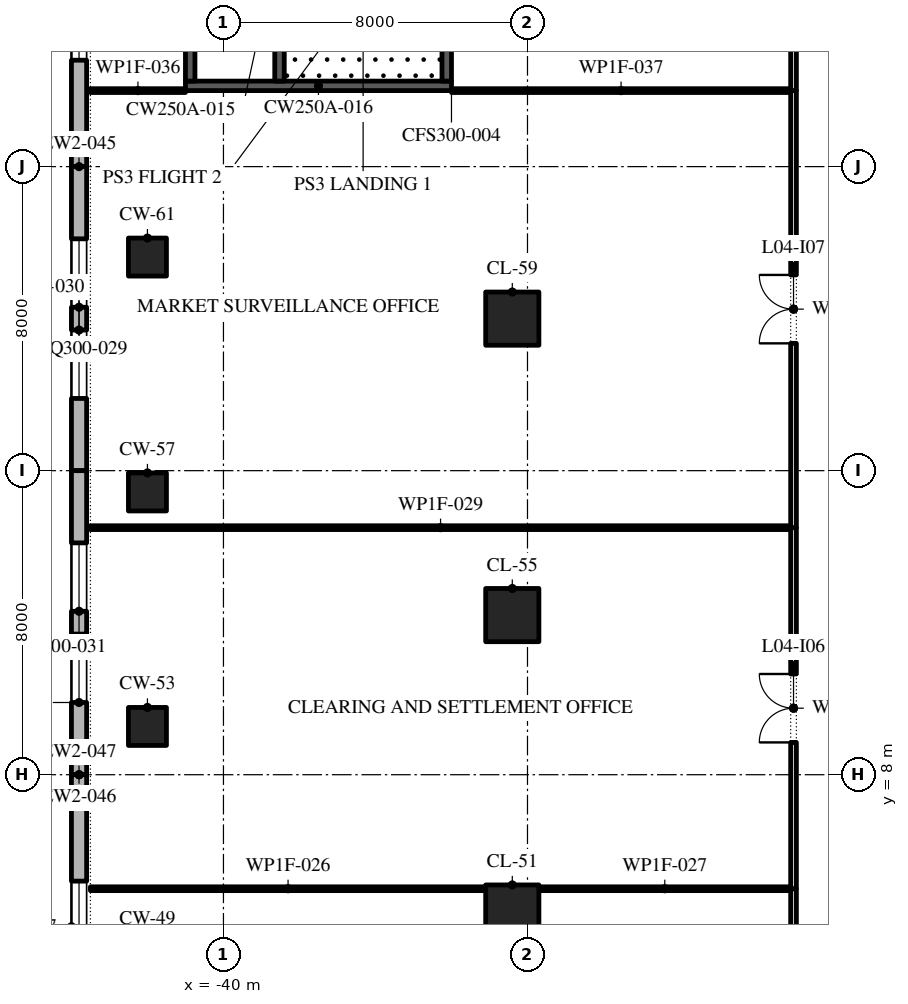
"""IFC4 building model, lengths in metres.
Left out: names, types, materials, properties, quantities, classifications, styles, units other than length and angle.
Written with IfcOpenShell. Run it as: python <this file> out.ifc"""

import sys

from ifc_helpers import new_model, si_unit, direction, frame, frame_2d, origin, origin_2d, place, context, subcontext, project, spatial, polyline, rectangle, outline, extrude, element, fill, save


model = new_model("IFC4")
c1 = context("Model", 3, precision=1e-05, world=origin(), true_north=direction((0.0, 1.0)))
c2 = subcontext(c1, "Body", "Model", "MODEL_VIEW")
j1 = project(units=[si_unit("LENGTHUNIT", "METRE"), si_unit("PLANEANGLEUNIT", "RADIAN")], contexts=[c1])
p1 = place(None, origin())
s1 = spatial("IfcSite", under=j1, at=p1, CompositionType="ELEMENT")
p2 = place(p1, origin())
s2 = spatial("IfcBuilding", under=s1, at=p2, CompositionType="ELEMENT")
p3 = place(p2, frame((0.0, 0.0, 24.0)))
s3 = spatial("IfcBuildingStorey", under=s2, at=p3, CompositionType="ELEMENT", Elevation=24.0)
p4 = place(p3, frame((-32.4, 4.4, 0.0), z_axis=(0.0, 0.0, 1.0), x_axis=(1.0, 0.0, 0.0)))
e1 = element("IfcColumn", 1, at=p4, inside=s3, PredefinedType="COLUMN", context=c2, shape_type="SweptSolid", body=[
    extrude(rectangle(XDim=1.4, YDim=1.4, at=origin_2d()), origin(), (0.0, 0.0, 1.0), 4.8),
])
p5 = place(p3, frame((-42.0, 9.27, 0.0), z_axis=(0.0, 0.0, 1.0), x_axis=(1.0, 0.0, 0.0)))
e2 = element("IfcColumn", 2, at=p5, inside=s3, PredefinedType="COLUMN", context=c2, shape_type="SweptSolid", body=[
    extrude(rectangle(XDim=1.0, YDim=1.0, at=origin_2d()), origin(), (0.0, 0.0, 1.0), 4.8),
])
p6 = place(p3, frame((-32.4, 12.2, 0.0), z_axis=(0.0, 0.0, 1.0), x_axis=(1.0, 0.0, 0.0)))
e3 = element("IfcColumn", 3, at=p6, inside=s3, PredefinedType="COLUMN", context=c2, shape_type="SweptSolid", body=[
    extrude(rectangle(XDim=1.4, YDim=1.4, at=origin_2d()), origin(), (0.0, 0.0, 1.0), 4.8),
])
p7 = place(p3, frame((-42.0, 15.44, 0.0), z_axis=(0.0, 0.0, 1.0), x_axis=(1.0, 0.0, 0.0)))
e4 = element("IfcColumn", 4, at=p7, inside=s3, PredefinedType="COLUMN", context=c2, shape_type="SweptSolid", body=[
    extrude(rectangle(XDim=1.0, YDim=1.0, at=origin_2d()), origin(), (0.0, 0.0, 1.0), 4.8),
])
p8 = place(p3, frame((-32.4, 20.0, 0.0), z_axis=(0.0, 0.0, 1.0), x_axis=(1.0, 0.0, 0.0)))
e5 = element("IfcColumn", 5, at=p8, inside=s3, PredefinedType="COLUMN", context=c2, shape_type="SweptSolid", body=[
    extrude(rectangle(XDim=1.4, YDim=1.4, at=origin_2d()), origin(), (0.0, 0.0, 1.0), 4.8),
])
p9 = place(p3, frame((-42.0, 21.62, 0.0), z_axis=(0.0, 0.0, 1.0), x_axis=(1.0, 0.0, 0.0)))
e6 = element("IfcColumn", 6, at=p9, inside=s3, PredefinedType="COLUMN", context=c2, shape_type="SweptSolid", body=[
    extrude(rectangle(XDim=1.0, YDim=1.0, at=origin_2d()), origin(), (0.0, 0.0, 1.0), 4.8),
])
p10 = place(p3, frame((-43.8, 32.0, 0.0), z_axis=(0.0, 0.0, 1.0), x_axis=(0.0, -1.0, 0.0)))
e7 = element("IfcWall", 7, at=p10, inside=s3, PredefinedType="STANDARD", context=c2, shape_type="SweptSolid", body=[
    extrude(rectangle(XDim=8.0, YDim=0.4, at=frame_2d((4.0, 0.0))), origin(), (0.0, 0.0, 1.0), 4.5),
])
p11 = place(p10, frame((2.8, 0.0, 0.9)))
e8 = element("IfcOpeningElement", 8, at=p11, cuts=e7, PredefinedType="OPENING", context=c2, shape_type="SweptSolid", body=[
    extrude(outline(polyline([(0.0, 0.0), (2.4, 0.0), (2.4, 1.5), (2.378, 1.758), (2.313, 2.009), (2.207, 2.245), (2.063, 2.46), (1.885, 2.648), (1.677, 2.804), (1.447, 2.922), (1.2, 3.0), (0.953, 2.922), (0.722, 2.804), (0.515, 2.648), (0.337, 2.46), (0.193, 2.245), (0.087, 2.009), (0.022, 1.758), (0.0, 1.5), (0.0, 0.0)])), frame((0.0, 0.21, 0.0), z_axis=(0.0, -1.0, 0.0), x_axis=(1.0, 0.0, 0.0)), (0.0, 0.0, 1.0), 0.42),
])
p12 = place(p3, frame((-43.8, 24.0, 0.0), z_axis=(0.0, 0.0, 1.0), x_axis=(0.0, -1.0, 0.0)))
e9 = element("IfcWall", 9, at=p12, inside=s3, PredefinedType="STANDARD", context=c2, shape_type="SweptSolid", body=[
    extrude(rectangle(XDim=8.0, YDim=0.4, at=frame_2d((4.0, 0.0))), origin(), (0.0, 0.0, 1.0), 4.5),
])
p13 = place(p12, frame((1.9, 0.0, 0.9)))
e10 = element("IfcOpeningElement", 10, at=p13, cuts=e9, PredefinedType="OPENING", context=c2, shape_type="SweptSolid", body=[
    extrude(outline(polyline([(0.0, 0.0), (1.8, 0.0), (1.8, 1.5), (1.785, 1.729), (1.738, 1.954), (1.662, 2.17), (1.558, 2.375), (1.427, 2.563), (1.271, 2.732), (1.095, 2.879), (0.9, 3.0), (0.705, 2.879), (0.529, 2.732), (0.373, 2.563), (0.242, 2.375), (0.138, 2.17), (0.062, 1.954), (0.015, 1.729), (0.0, 1.5), (0.0, 0.0)])), frame((0.0, 0.21, 0.0), z_axis=(0.0, -1.0, 0.0), x_axis=(1.0, 0.0, 0.0)), (0.0, 0.0, 1.0), 0.42),
])
p14 = place(p12, frame((4.3, 0.0, 0.9)))
e11 = element("IfcOpeningElement", 11, at=p14, cuts=e9, PredefinedType="OPENING", context=c2, shape_type="SweptSolid", body=[
    extrude(outline(polyline([(0.0, 0.0), (1.8, 0.0), (1.8, 1.5), (1.785, 1.729), (1.738, 1.954), (1.662, 2.17), (1.558, 2.375), (1.427, 2.563), (1.271, 2.732), (1.095, 2.879), (0.9, 3.0), (0.705, 2.879), (0.529, 2.732), (0.373, 2.563), (0.242, 2.375), (0.138, 2.17), (0.062, 1.954), (0.015, 1.729), (0.0, 1.5), (0.0, 0.0)])), frame((0.0, 0.21, 0.0), z_axis=(0.0, -1.0, 0.0), x_axis=(1.0, 0.0, 0.0)), (0.0, 0.0, 1.0), 0.42),
])
p15 = place(p3, frame((-43.8, 16.0, 0.0), z_axis=(0.0, 0.0, 1.0), x_axis=(0.0, -1.0, 0.0)))
e12 = element("IfcWall", 12, at=p15, inside=s3, PredefinedType="STANDARD", context=c2, shape_type="SweptSolid", body=[
    extrude(rectangle(XDim=8.0, YDim=0.4, at=frame_2d((4.0, 0.0))), origin(), (0.0, 0.0, 1.0), 4.5),
])
p16 = place(p15, frame((1.9, 0.0, 0.9)))
e13 = element("IfcOpeningElement", 13, at=p16, cuts=e12, PredefinedType="OPENING", context=c2, shape_type="SweptSolid", body=[
    extrude(outline(polyline([(0.0, 0.0), (1.8, 0.0), (1.8, 1.5), (1.785, 1.729), (1.738, 1.954), (1.662, 2.17), (1.558, 2.375), (1.427, 2.563), (1.271, 2.732), (1.095, 2.879), (0.9, 3.0), (0.705, 2.879), (0.529, 2.732), (0.373, 2.563), (0.242, 2.375), (0.138, 2.17), (0.062, 1.954), (0.015, 1.729), (0.0, 1.5), (0.0, 0.0)])), frame((0.0, 0.21, 0.0), z_axis=(0.0, -1.0, 0.0), x_axis=(1.0, 0.0, 0.0)), (0.0, 0.0, 1.0), 0.42),
])
p17 = place(p15, frame((4.3, 0.0, 0.9)))
e14 = element("IfcOpeningElement", 14, at=p17, cuts=e12, PredefinedType="OPENING", context=c2, shape_type="SweptSolid", body=[
    extrude(outline(polyline([(0.0, 0.0), (1.8, 0.0), (1.8, 1.5), (1.785, 1.729), (1.738, 1.954), (1.662, 2.17), (1.558, 2.375), (1.427, 2.563), (1.271, 2.732), (1.095, 2.879), (0.9, 3.0), (0.705, 2.879), (0.529, 2.732), (0.373, 2.563), (0.242, 2.375), (0.138, 2.17), (0.062, 1.954), (0.015, 1.729), (0.0, 1.5), (0.0, 0.0)])), frame((0.0, 0.21, 0.0), z_axis=(0.0, -1.0, 0.0), x_axis=(1.0, 0.0, 0.0)), (0.0, 0.0, 1.0), 0.42),
])
p18 = place(p3, frame((-43.8, 8.0, 0.0), z_axis=(0.0, 0.0, 1.0), x_axis=(0.0, -1.0, 0.0)))
e15 = element("IfcWall", 15, at=p18, inside=s3, PredefinedType="STANDARD", context=c2, shape_type="SweptSolid", body=[
    extrude(rectangle(XDim=8.0, YDim=0.4, at=frame_2d((4.0, 0.0))), origin(), (0.0, 0.0, 1.0), 4.5),
])
p19 = place(p18, frame((2.8, 0.0, 0.9)))
e16 = element("IfcOpeningElement", 16, at=p19, cuts=e15, PredefinedType="OPENING", context=c2, shape_type="SweptSolid", body=[
    extrude(outline(polyline([(0.0, 0.0), (2.4, 0.0), (2.4, 1.5), (2.378, 1.758), (2.313, 2.009), (2.207, 2.245), (2.063, 2.46), (1.885, 2.648), (1.677, 2.804), (1.447, 2.922), (1.2, 3.0), (0.953, 2.922), (0.722, 2.804), (0.515, 2.648), (0.337, 2.46), (0.193, 2.245), (0.087, 2.009), (0.022, 1.758), (0.0, 1.5), (0.0, 0.0)])), frame((0.0, 0.21, 0.0), z_axis=(0.0, -1.0, 0.0), x_axis=(1.0, 0.0, 0.0)), (0.0, 0.0, 1.0), 0.42),
])
p20 = place(p3, frame((-41.0, 26.125, 0.0), z_axis=(0.0, 0.0, 1.0), x_axis=(1.0, 0.0, 0.0)))
e17 = element("IfcWall", 17, at=p20, inside=s3, PredefinedType="SHEAR", context=c2, shape_type="SweptSolid", body=[
    extrude(rectangle(XDim=7.0, YDim=0.25, at=frame_2d((3.5, 0.0))), origin(), (0.0, 0.0, 1.0), 4.5),
])
p21 = place(p3, frame((-40.875, 26.25, 0.0), z_axis=(0.0, 0.0, 1.0), x_axis=(0.0, 1.0, 0.0)))
e18 = element("IfcWall", 18, at=p21, inside=s3, PredefinedType="SHEAR", context=c2, shape_type="SweptSolid", body=[
    extrude(rectangle(XDim=7.5, YDim=0.25, at=frame_2d((3.75, 0.0))), origin(), (0.0, 0.0, 1.0), 4.5),
])
p22 = place(p21, frame((4.25, 0.0, 0.0)))
e19 = element("IfcOpeningElement", 19, at=p22, cuts=e18, PredefinedType="OPENING", context=c2, shape_type="SweptSolid", body=[
    extrude(rectangle(XDim=0.9, YDim=2.1, at=frame_2d((0.45, 1.05))), frame((0.0, 0.135, 0.0), z_axis=(0.0, -1.0, 0.0), x_axis=(1.0, 0.0, 0.0)), (0.0, 0.0, 1.0), 0.27),
])
p23 = place(p3, frame((-34.125, 26.25, 0.0), z_axis=(0.0, 0.0, 1.0), x_axis=(0.0, 1.0, 0.0)))
e20 = element("IfcWall", 20, at=p23, inside=s3, PredefinedType="SHEAR", context=c2, shape_type="SweptSolid", body=[
    extrude(rectangle(XDim=7.5, YDim=0.25, at=frame_2d((3.75, 0.0))), origin(), (0.0, 0.0, 1.0), 4.5),
])
p24 = place(p23, frame((5.7, 0.0, 0.0)))
e21 = element("IfcOpeningElement", 21, at=p24, cuts=e20, PredefinedType="OPENING", context=c2, shape_type="SweptSolid", body=[
    extrude(rectangle(XDim=1.2, YDim=2.1, at=frame_2d((0.6, 1.05))), frame((0.0, 0.135, 0.0), z_axis=(0.0, -1.0, 0.0), x_axis=(1.0, 0.0, 0.0)), (0.0, 0.0, 1.0), 0.27),
])
p25 = place(p3, frame((-38.525, 26.25, 0.0), z_axis=(0.0, 0.0, 1.0), x_axis=(0.0, 1.0, 0.0)))
e22 = element("IfcWall", 22, at=p25, inside=s3, PredefinedType="SHEAR", context=c2, shape_type="SweptSolid", body=[
    extrude(rectangle(XDim=7.5, YDim=0.25, at=frame_2d((3.75, 0.0))), origin(), (0.0, 0.0, 1.0), 4.5),
])
p26 = place(p3, frame((-43.5, 5.0, 0.0), z_axis=(0.0, 0.0, 1.0), x_axis=(1.0, 0.0, 0.0)))
e23 = element("IfcWall", 23, at=p26, inside=s3, PredefinedType="PARTITIONING", context=c2, shape_type="SweptSolid", body=[
    extrude(rectangle(XDim=10.4, YDim=0.1, at=frame_2d((5.2, 0.0))), origin(), (0.0, 0.0, 1.0), 4.5),
])
p27 = place(p3, frame((-31.7, 5.0, 0.0), z_axis=(0.0, 0.0, 1.0), x_axis=(1.0, 0.0, 0.0)))
e24 = element("IfcWall", 24, at=p27, inside=s3, PredefinedType="PARTITIONING", context=c2, shape_type="SweptSolid", body=[
    extrude(rectangle(XDim=6.625, YDim=0.1, at=frame_2d((3.312, 0.0))), origin(), (0.0, 0.0, 1.0), 4.5),
])
p28 = place(p3, frame((-43.5, 14.5, 0.0), z_axis=(0.0, 0.0, 1.0), x_axis=(1.0, 0.0, 0.0)))
e25 = element("IfcWall", 25, at=p28, inside=s3, PredefinedType="PARTITIONING", context=c2, shape_type="SweptSolid", body=[
    extrude(rectangle(XDim=18.425, YDim=0.1, at=frame_2d((9.212, 0.0))), origin(), (0.0, 0.0, 1.0), 4.5),
])
p29 = place(p3, frame((-43.5, 26.0, 0.0), z_axis=(0.0, 0.0, 1.0), x_axis=(1.0, 0.0, 0.0)))
e26 = element("IfcWall", 26, at=p29, inside=s3, PredefinedType="PARTITIONING", context=c2, shape_type="SweptSolid", body=[
    extrude(rectangle(XDim=2.5, YDim=0.1, at=frame_2d((1.25, 0.0))), origin(), (0.0, 0.0, 1.0), 4.5),
])
p30 = place(p3, frame((-34.0, 26.0, 0.0), z_axis=(0.0, 0.0, 1.0), x_axis=(1.0, 0.0, 0.0)))
e27 = element("IfcWall", 27, at=p30, inside=s3, PredefinedType="PARTITIONING", context=c2, shape_type="SweptSolid", body=[
    extrude(rectangle(XDim=8.925, YDim=0.1, at=frame_2d((4.462, 0.0))), origin(), (0.0, 0.0, 1.0), 4.5),
])
p31 = place(p3, frame((-25.0, -5.5, 0.0), z_axis=(0.0, 0.0, 1.0), x_axis=(0.0, 1.0, 0.0)))
e28 = element("IfcWall", 28, at=p31, inside=s3, PredefinedType="PARTITIONING", context=c2, shape_type="SweptSolid", body=[
    extrude(rectangle(XDim=10.5, YDim=0.15, at=frame_2d((5.25, 0.0))), origin(), (0.0, 0.0, 1.0), 4.5),
])
p32 = place(p31, frame((4.35, 0.0, 0.0)))
e29 = element("IfcOpeningElement", 29, at=p32, cuts=e28, PredefinedType="OPENING", context=c2, shape_type="SweptSolid", body=[
    extrude(rectangle(XDim=1.8, YDim=2.1, at=frame_2d((0.9, 1.05))), frame((0.0, 0.085, 0.0), z_axis=(0.0, -1.0, 0.0), x_axis=(1.0, 0.0, 0.0)), (0.0, 0.0, 1.0), 0.17),
])
p33 = place(p3, frame((-25.0, 5.0, 0.0), z_axis=(0.0, 0.0, 1.0), x_axis=(0.0, 1.0, 0.0)))
e30 = element("IfcWall", 30, at=p33, inside=s3, PredefinedType="PARTITIONING", context=c2, shape_type="SweptSolid", body=[
    extrude(rectangle(XDim=9.5, YDim=0.15, at=frame_2d((4.75, 0.0))), origin(), (0.0, 0.0, 1.0), 4.5),
])
p34 = place(p33, frame((3.85, 0.0, 0.0)))
e31 = element("IfcOpeningElement", 31, at=p34, cuts=e30, PredefinedType="OPENING", context=c2, shape_type="SweptSolid", body=[
    extrude(rectangle(XDim=1.8, YDim=2.1, at=frame_2d((0.9, 1.05))), frame((0.0, 0.085, 0.0), z_axis=(0.0, -1.0, 0.0), x_axis=(1.0, 0.0, 0.0)), (0.0, 0.0, 1.0), 0.17),
])
p35 = place(p3, frame((-25.0, 14.5, 0.0), z_axis=(0.0, 0.0, 1.0), x_axis=(0.0, 1.0, 0.0)))
e32 = element("IfcWall", 32, at=p35, inside=s3, PredefinedType="PARTITIONING", context=c2, shape_type="SweptSolid", body=[
    extrude(rectangle(XDim=11.5, YDim=0.15, at=frame_2d((5.75, 0.0))), origin(), (0.0, 0.0, 1.0), 4.5),
])
p36 = place(p35, frame((4.85, 0.0, 0.0)))
e33 = element("IfcOpeningElement", 33, at=p36, cuts=e32, PredefinedType="OPENING", context=c2, shape_type="SweptSolid", body=[
    extrude(rectangle(XDim=1.8, YDim=2.1, at=frame_2d((0.9, 1.05))), frame((0.0, 0.085, 0.0), z_axis=(0.0, -1.0, 0.0), x_axis=(1.0, 0.0, 0.0)), (0.0, 0.0, 1.0), 0.17),
])
p37 = place(p3, frame((-25.0, 26.0, 0.0), z_axis=(0.0, 0.0, 1.0), x_axis=(0.0, 1.0, 0.0)))
e34 = element("IfcWall", 34, at=p37, inside=s3, PredefinedType="PARTITIONING", context=c2, shape_type="SweptSolid", body=[
    extrude(rectangle(XDim=9.5, YDim=0.15, at=frame_2d((4.75, 0.0))), origin(), (0.0, 0.0, 1.0), 4.5),
])
p38 = place(p37, frame((4.25, 0.0, 0.0)))
e35 = element("IfcOpeningElement", 35, at=p38, cuts=e34, PredefinedType="OPENING", context=c2, shape_type="SweptSolid", body=[
    extrude(rectangle(XDim=1.0, YDim=2.1, at=frame_2d((0.5, 1.05))), frame((0.0, 0.085, 0.0), z_axis=(0.0, -1.0, 0.0), x_axis=(1.0, 0.0, 0.0)), (0.0, 0.0, 1.0), 0.17),
])
p39 = place(p11, origin())
e36 = element("IfcWindow", 36, at=p39, inside=s3, PartitioningType="DOUBLE_PANEL_VERTICAL", PredefinedType="WINDOW", context=c2, shape_type="SweptSolid", body=[
    extrude(outline(polyline([(0.0, 0.0), (2.4, 0.0), (2.4, 1.5), (2.378, 1.758), (2.313, 2.009), (2.207, 2.245), (2.063, 2.46), (1.885, 2.648), (1.677, 2.804), (1.447, 2.922), (1.2, 3.0), (0.953, 2.922), (0.722, 2.804), (0.515, 2.648), (0.337, 2.46), (0.193, 2.245), (0.087, 2.009), (0.022, 1.758), (0.0, 1.5), (0.0, 0.0)])), frame((0.0, 0.03, 0.0), z_axis=(0.0, -1.0, 0.0), x_axis=(1.0, 0.0, 0.0)), (0.0, 0.0, 1.0), 0.06),
])
fill(e8, e36)
p40 = place(p13, origin())
e37 = element("IfcWindow", 37, at=p40, inside=s3, PartitioningType="DOUBLE_PANEL_VERTICAL", PredefinedType="WINDOW", context=c2, shape_type="SweptSolid", body=[
    extrude(outline(polyline([(0.0, 0.0), (1.8, 0.0), (1.8, 1.5), (1.785, 1.729), (1.738, 1.954), (1.662, 2.17), (1.558, 2.375), (1.427, 2.563), (1.271, 2.732), (1.095, 2.879), (0.9, 3.0), (0.705, 2.879), (0.529, 2.732), (0.373, 2.563), (0.242, 2.375), (0.138, 2.17), (0.062, 1.954), (0.015, 1.729), (0.0, 1.5), (0.0, 0.0)])), frame((0.0, 0.03, 0.0), z_axis=(0.0, -1.0, 0.0), x_axis=(1.0, 0.0, 0.0)), (0.0, 0.0, 1.0), 0.06),
])
fill(e10, e37)
p41 = place(p14, origin())
e38 = element("IfcWindow", 38, at=p41, inside=s3, PartitioningType="DOUBLE_PANEL_VERTICAL", PredefinedType="WINDOW", context=c2, shape_type="SweptSolid", body=[
    extrude(outline(polyline([(0.0, 0.0), (1.8, 0.0), (1.8, 1.5), (1.785, 1.729), (1.738, 1.954), (1.662, 2.17), (1.558, 2.375), (1.427, 2.563), (1.271, 2.732), (1.095, 2.879), (0.9, 3.0), (0.705, 2.879), (0.529, 2.732), (0.373, 2.563), (0.242, 2.375), (0.138, 2.17), (0.062, 1.954), (0.015, 1.729), (0.0, 1.5), (0.0, 0.0)])), frame((0.0, 0.03, 0.0), z_axis=(0.0, -1.0, 0.0), x_axis=(1.0, 0.0, 0.0)), (0.0, 0.0, 1.0), 0.06),
])
fill(e11, e38)
p42 = place(p16, origin())
e39 = element("IfcWindow", 39, at=p42, inside=s3, PartitioningType="DOUBLE_PANEL_VERTICAL", PredefinedType="WINDOW", context=c2, shape_type="SweptSolid", body=[
    extrude(outline(polyline([(0.0, 0.0), (1.8, 0.0), (1.8, 1.5), (1.785, 1.729), (1.738, 1.954), (1.662, 2.17), (1.558, 2.375), (1.427, 2.563), (1.271, 2.732), (1.095, 2.879), (0.9, 3.0), (0.705, 2.879), (0.529, 2.732), (0.373, 2.563), (0.242, 2.375), (0.138, 2.17), (0.062, 1.954), (0.015, 1.729), (0.0, 1.5), (0.0, 0.0)])), frame((0.0, 0.03, 0.0), z_axis=(0.0, -1.0, 0.0), x_axis=(1.0, 0.0, 0.0)), (0.0, 0.0, 1.0), 0.06),
])
fill(e13, e39)
p43 = place(p17, origin())
e40 = element("IfcWindow", 40, at=p43, inside=s3, PartitioningType="DOUBLE_PANEL_VERTICAL", PredefinedType="WINDOW", context=c2, shape_type="SweptSolid", body=[
    extrude(outline(polyline([(0.0, 0.0), (1.8, 0.0), (1.8, 1.5), (1.785, 1.729), (1.738, 1.954), (1.662, 2.17), (1.558, 2.375), (1.427, 2.563), (1.271, 2.732), (1.095, 2.879), (0.9, 3.0), (0.705, 2.879), (0.529, 2.732), (0.373, 2.563), (0.242, 2.375), (0.138, 2.17), (0.062, 1.954), (0.015, 1.729), (0.0, 1.5), (0.0, 0.0)])), frame((0.0, 0.03, 0.0), z_axis=(0.0, -1.0, 0.0), x_axis=(1.0, 0.0, 0.0)), (0.0, 0.0, 1.0), 0.06),
])
fill(e14, e40)
p44 = place(p19, origin())
e41 = element("IfcWindow", 41, at=p44, inside=s3, PartitioningType="DOUBLE_PANEL_VERTICAL", PredefinedType="WINDOW", context=c2, shape_type="SweptSolid", body=[
    extrude(outline(polyline([(0.0, 0.0), (2.4, 0.0), (2.4, 1.5), (2.378, 1.758), (2.313, 2.009), (2.207, 2.245), (2.063, 2.46), (1.885, 2.648), (1.677, 2.804), (1.447, 2.922), (1.2, 3.0), (0.953, 2.922), (0.722, 2.804), (0.515, 2.648), (0.337, 2.46), (0.193, 2.245), (0.087, 2.009), (0.022, 1.758), (0.0, 1.5), (0.0, 0.0)])), frame((0.0, 0.03, 0.0), z_axis=(0.0, -1.0, 0.0), x_axis=(1.0, 0.0, 0.0)), (0.0, 0.0, 1.0), 0.06),
])
fill(e16, e41)
p45 = place(p34, origin())
e42 = element("IfcDoor", 42, at=p45, inside=s3, OperationType="SINGLE_SWING_RIGHT", PredefinedType="DOOR", context=c2, shape_type="SweptSolid", body=[
    extrude(rectangle(XDim=1.8, YDim=2.1, at=frame_2d((0.9, 1.05))), frame((0.0, 0.025, 0.0), z_axis=(0.0, -1.0, 0.0), x_axis=(1.0, 0.0, 0.0)), (0.0, 0.0, 1.0), 0.05),
])
fill(e31, e42)
p46 = place(p36, origin())
e43 = element("IfcDoor", 43, at=p46, inside=s3, OperationType="SINGLE_SWING_RIGHT", PredefinedType="DOOR", context=c2, shape_type="SweptSolid", body=[
    extrude(rectangle(XDim=1.8, YDim=2.1, at=frame_2d((0.9, 1.05))), frame((0.0, 0.025, 0.0), z_axis=(0.0, -1.0, 0.0), x_axis=(1.0, 0.0, 0.0)), (0.0, 0.0, 1.0), 0.05),
])
fill(e33, e43)
save(model, sys.argv[1])
